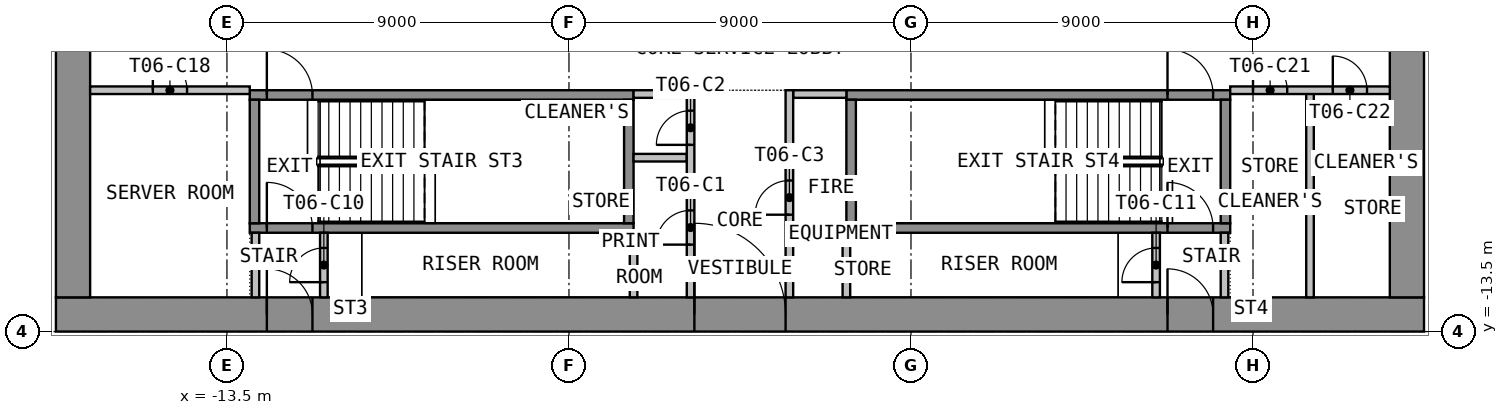
"""IFC4 building model, lengths in metres.
Left out: names, types, materials, properties, quantities, classifications, styles, units other than length and angle.
Written with IfcOpenShell. Run it as: python <this file> out.ifc"""

import sys

from ifc_helpers import new_model, si_unit, direction, frame, frame_2d, origin, place, context, subcontext, project, spatial, rectangle, extrude, element, fill, save


model = new_model("IFC4")
c1 = context("Model", 3, precision=1e-05, world=origin(), true_north=direction((0.0, 1.0)))
c2 = subcontext(c1, "Body", "Model", "MODEL_VIEW")
j1 = project(units=[si_unit("LENGTHUNIT", "METRE"), si_unit("PLANEANGLEUNIT", "RADIAN")], contexts=[c1])
p1 = place(None, origin())
s1 = spatial("IfcSite", under=j1, at=p1, CompositionType="ELEMENT")
p2 = place(p1, origin())
s2 = spatial("IfcBuilding", under=s1, at=p2, CompositionType="ELEMENT")
p3 = place(p2, frame((0.0, 0.0, 93.0)))
s3 = spatial("IfcBuildingStorey", under=s2, at=p3, CompositionType="ELEMENT", Elevation=93.0)
p4 = place(p3, frame((-18.0, -13.05, 0.0), z_axis=(0.0, 0.0, 1.0), x_axis=(1.0, 0.0, 0.0)))
e1 = element("IfcWall", 1, at=p4, inside=s3, PredefinedType="SHEAR", context=c2, shape_type="SweptSolid", body=[
    extrude(rectangle(XDim=36.0, YDim=0.9, at=frame_2d((18.0, 0.0))), origin(), (0.0, 0.0, 1.0), 3.525),
])
p5 = place(p4, frame((16.8, 0.0, 0.0)))
e2 = element("IfcOpeningElement", 2, at=p5, cuts=e1, PredefinedType="OPENING", context=c2, shape_type="SweptSolid", body=[
    extrude(rectangle(XDim=2.4, YDim=2.1, at=frame_2d((1.2, 1.05))), frame((0.0, 0.46, 0.0), z_axis=(0.0, -1.0, 0.0), x_axis=(1.0, 0.0, 0.0)), (0.0, 0.0, 1.0), 0.92),
])
p6 = place(p4, frame((5.55, 0.0, 0.0)))
e3 = element("IfcOpeningElement", 3, at=p6, cuts=e1, PredefinedType="OPENING", context=c2, shape_type="SweptSolid", body=[
    extrude(rectangle(XDim=1.2, YDim=2.1, at=frame_2d((0.6, 1.05))), frame((0.0, 0.46, 0.0), z_axis=(0.0, -1.0, 0.0), x_axis=(1.0, 0.0, 0.0)), (0.0, 0.0, 1.0), 0.92),
])
p7 = place(p4, frame((29.25, 0.0, 0.0)))
e4 = element("IfcOpeningElement", 4, at=p7, cuts=e1, PredefinedType="OPENING", context=c2, shape_type="SweptSolid", body=[
    extrude(rectangle(XDim=1.2, YDim=2.1, at=frame_2d((0.6, 1.05))), frame((0.0, 0.46, 0.0), z_axis=(0.0, -1.0, 0.0), x_axis=(1.0, 0.0, 0.0)), (0.0, 0.0, 1.0), 0.92),
])
p8 = place(p3, frame((-17.55, -12.6, 0.0), z_axis=(0.0, 0.0, 1.0), x_axis=(0.0, 1.0, 0.0)))
e5 = element("IfcWall", 5, at=p8, inside=s3, PredefinedType="SHEAR", context=c2, shape_type="SweptSolid", body=[
    extrude(rectangle(XDim=25.2, YDim=0.9, at=frame_2d((12.6, 0.0))), origin(), (0.0, 0.0, 1.0), 3.525),
])
p9 = place(p8, frame((11.4, 0.0, 0.0)))
e6 = element("IfcOpeningElement", 6, at=p9, cuts=e5, PredefinedType="OPENING", context=c2, shape_type="SweptSolid", body=[
    extrude(rectangle(XDim=2.4, YDim=2.1, at=frame_2d((1.2, 1.05))), frame((0.0, 0.46, 0.0), z_axis=(0.0, -1.0, 0.0), x_axis=(1.0, 0.0, 0.0)), (0.0, 0.0, 1.0), 0.92),
])
p10 = place(p3, frame((17.55, -12.6, 0.0), z_axis=(0.0, 0.0, 1.0), x_axis=(0.0, 1.0, 0.0)))
e7 = element("IfcWall", 7, at=p10, inside=s3, PredefinedType="SHEAR", context=c2, shape_type="SweptSolid", body=[
    extrude(rectangle(XDim=25.2, YDim=0.9, at=frame_2d((12.6, 0.0))), origin(), (0.0, 0.0, 1.0), 3.525),
])
p11 = place(p10, frame((11.4, 0.0, 0.0)))
e8 = element("IfcOpeningElement", 8, at=p11, cuts=e7, PredefinedType="OPENING", context=c2, shape_type="SweptSolid", body=[
    extrude(rectangle(XDim=2.4, YDim=2.1, at=frame_2d((1.2, 1.05))), frame((0.0, 0.46, 0.0), z_axis=(0.0, -1.0, 0.0), x_axis=(1.0, 0.0, 0.0)), (0.0, 0.0, 1.0), 0.92),
])
p12 = place(p3, frame((-12.9, -10.775, 0.0), z_axis=(0.0, 0.0, 1.0), x_axis=(1.0, 0.0, 0.0)))
e9 = element("IfcWall", 9, at=p12, inside=s3, PredefinedType="SHEAR", context=c2, shape_type="SweptSolid", body=[
    extrude(rectangle(XDim=10.1, YDim=0.25, at=frame_2d((5.05, 0.0))), origin(), (0.0, 0.0, 1.0), 3.525),
])
p13 = place(p12, frame((0.45, 0.0, 0.0)))
e10 = element("IfcOpeningElement", 10, at=p13, cuts=e9, PredefinedType="OPENING", context=c2, shape_type="SweptSolid", body=[
    extrude(rectangle(XDim=1.2, YDim=2.1, at=frame_2d((0.6, 1.05))), frame((0.0, 0.135, 0.0), z_axis=(0.0, -1.0, 0.0), x_axis=(1.0, 0.0, 0.0)), (0.0, 0.0, 1.0), 0.27),
])
p14 = place(p3, frame((-12.9, -7.275, 0.0), z_axis=(0.0, 0.0, 1.0), x_axis=(1.0, 0.0, 0.0)))
e11 = element("IfcWall", 11, at=p14, inside=s3, PredefinedType="SHEAR", context=c2, shape_type="SweptSolid", body=[
    extrude(rectangle(XDim=10.1, YDim=0.25, at=frame_2d((5.05, 0.0))), origin(), (0.0, 0.0, 1.0), 3.525),
])
p15 = place(p14, frame((0.45, 0.0, 0.0)))
e12 = element("IfcOpeningElement", 12, at=p15, cuts=e11, PredefinedType="OPENING", context=c2, shape_type="SweptSolid", body=[
    extrude(rectangle(XDim=1.2, YDim=2.1, at=frame_2d((0.6, 1.05))), frame((0.0, 0.135, 0.0), z_axis=(0.0, -1.0, 0.0), x_axis=(1.0, 0.0, 0.0)), (0.0, 0.0, 1.0), 0.27),
])
for number, where, z_axis, x_axis in (
    (13, (-12.775, -10.65, 0.0), (0.0, 0.0, 1.0), (0.0, 1.0, 0.0)),
    (14, (-2.925, -10.65, 0.0), (0.0, 0.0, 1.0), (0.0, 1.0, 0.0)),
):
    element("IfcWall", number, at=place(p3, frame(where, z_axis=z_axis, x_axis=x_axis)), inside=s3, PredefinedType="SHEAR", context=c2, shape_type="SweptSolid", body=[
        extrude(rectangle(XDim=3.25, YDim=0.25, at=frame_2d((1.625, 0.0))), origin(), (0.0, 0.0, 1.0), 3.525),
    ])
p16 = place(p3, frame((2.8, -10.775, 0.0), z_axis=(0.0, 0.0, 1.0), x_axis=(1.0, 0.0, 0.0)))
e15 = element("IfcWall", 15, at=p16, inside=s3, PredefinedType="SHEAR", context=c2, shape_type="SweptSolid", body=[
    extrude(rectangle(XDim=10.1, YDim=0.25, at=frame_2d((5.05, 0.0))), origin(), (0.0, 0.0, 1.0), 3.525),
])
p17 = place(p16, frame((8.45, 0.0, 0.0)))
e16 = element("IfcOpeningElement", 16, at=p17, cuts=e15, PredefinedType="OPENING", context=c2, shape_type="SweptSolid", body=[
    extrude(rectangle(XDim=1.2, YDim=2.1, at=frame_2d((0.6, 1.05))), frame((0.0, 0.135, 0.0), z_axis=(0.0, -1.0, 0.0), x_axis=(1.0, 0.0, 0.0)), (0.0, 0.0, 1.0), 0.27),
])
p18 = place(p3, frame((2.8, -7.275, 0.0), z_axis=(0.0, 0.0, 1.0), x_axis=(1.0, 0.0, 0.0)))
e17 = element("IfcWall", 17, at=p18, inside=s3, PredefinedType="SHEAR", context=c2, shape_type="SweptSolid", body=[
    extrude(rectangle(XDim=10.1, YDim=0.25, at=frame_2d((5.05, 0.0))), origin(), (0.0, 0.0, 1.0), 3.525),
])
p19 = place(p18, frame((8.45, 0.0, 0.0)))
e18 = element("IfcOpeningElement", 18, at=p19, cuts=e17, PredefinedType="OPENING", context=c2, shape_type="SweptSolid", body=[
    extrude(rectangle(XDim=1.2, YDim=2.1, at=frame_2d((0.6, 1.05))), frame((0.0, 0.135, 0.0), z_axis=(0.0, -1.0, 0.0), x_axis=(1.0, 0.0, 0.0)), (0.0, 0.0, 1.0), 0.27),
])
for number, where, z_axis, x_axis in (
    (19, (2.925, -10.65, 0.0), (0.0, 0.0, 1.0), (0.0, 1.0, 0.0)),
    (20, (12.775, -10.65, 0.0), (0.0, 0.0, 1.0), (0.0, 1.0, 0.0)),
):
    element("IfcWall", number, at=place(p3, frame(where, z_axis=z_axis, x_axis=x_axis)), inside=s3, PredefinedType="SHEAR", context=c2, shape_type="SweptSolid", body=[
        extrude(rectangle(XDim=3.25, YDim=0.25, at=frame_2d((1.625, 0.0))), origin(), (0.0, 0.0, 1.0), 3.525),
    ])
for number, where, z_axis, x_axis in (
    (21, (-2.8, -7.25, 0.0), (0.0, 0.0, 1.0), (1.0, 0.0, 0.0)),
    (22, (-2.8, -8.925, 0.0), (0.0, 0.0, 1.0), (1.0, 0.0, 0.0)),
    (23, (1.4, -7.25, 0.0), (0.0, 0.0, 1.0), (1.0, 0.0, 0.0)),
):
    element("IfcWall", number, at=place(p3, frame(where, z_axis=z_axis, x_axis=x_axis)), inside=s3, PredefinedType="PARTITIONING", context=c2, shape_type="SweptSolid", body=[
        extrude(rectangle(XDim=1.4, YDim=0.2, at=frame_2d((0.7, 0.0))), origin(), (0.0, 0.0, 1.0), 3.525),
    ])
p20 = place(p3, frame((-1.3, -12.6, 0.0), z_axis=(0.0, 0.0, 1.0), x_axis=(0.0, 1.0, 0.0)))
e24 = element("IfcWall", 24, at=p20, inside=s3, PredefinedType="PARTITIONING", context=c2, shape_type="SweptSolid", body=[
    extrude(rectangle(XDim=5.45, YDim=0.2, at=frame_2d((2.725, 0.0))), origin(), (0.0, 0.0, 1.0), 3.525),
])
p21 = place(p20, frame((1.387, 0.0, 0.0)))
e25 = element("IfcOpeningElement", 25, at=p21, cuts=e24, PredefinedType="OPENING", context=c2, shape_type="SweptSolid", body=[
    extrude(rectangle(XDim=0.9, YDim=2.1, at=frame_2d((0.45, 1.05))), frame((0.0, 0.11, 0.0), z_axis=(0.0, -1.0, 0.0), x_axis=(1.0, 0.0, 0.0)), (0.0, 0.0, 1.0), 0.22),
])
p22 = place(p20, frame((4.012, 0.0, 0.0)))
e26 = element("IfcOpeningElement", 26, at=p22, cuts=e24, PredefinedType="OPENING", context=c2, shape_type="SweptSolid", body=[
    extrude(rectangle(XDim=0.9, YDim=2.1, at=frame_2d((0.45, 1.05))), frame((0.0, 0.11, 0.0), z_axis=(0.0, -1.0, 0.0), x_axis=(1.0, 0.0, 0.0)), (0.0, 0.0, 1.0), 0.22),
])
p23 = place(p3, frame((1.3, -12.6, 0.0), z_axis=(0.0, 0.0, 1.0), x_axis=(0.0, 1.0, 0.0)))
e27 = element("IfcWall", 27, at=p23, inside=s3, PredefinedType="PARTITIONING", context=c2, shape_type="SweptSolid", body=[
    extrude(rectangle(XDim=5.45, YDim=0.2, at=frame_2d((2.725, 0.0))), origin(), (0.0, 0.0, 1.0), 3.525),
])
p24 = place(p23, frame((2.175, 0.0, 0.0)))
e28 = element("IfcOpeningElement", 28, at=p24, cuts=e27, PredefinedType="OPENING", context=c2, shape_type="SweptSolid", body=[
    extrude(rectangle(XDim=0.9, YDim=2.1, at=frame_2d((0.45, 1.05))), frame((0.0, 0.11, 0.0), z_axis=(0.0, -1.0, 0.0), x_axis=(1.0, 0.0, 0.0)), (0.0, 0.0, 1.0), 0.22),
])
p25 = place(p3, frame((-12.75, -12.6, 0.0), z_axis=(0.0, 0.0, 1.0), x_axis=(0.0, 1.0, 0.0)))
e29 = element("IfcWall", 29, at=p25, inside=s3, PredefinedType="PARTITIONING", context=c2, shape_type="SweptSolid", body=[
    extrude(rectangle(XDim=1.7, YDim=0.2, at=frame_2d((0.85, 0.0))), origin(), (0.0, 0.0, 1.0), 3.525),
])
p26 = place(p3, frame((-10.95, -12.6, 0.0), z_axis=(0.0, 0.0, 1.0), x_axis=(0.0, 1.0, 0.0)))
e30 = element("IfcWall", 30, at=p26, inside=s3, PredefinedType="PARTITIONING", context=c2, shape_type="SweptSolid", body=[
    extrude(rectangle(XDim=1.7, YDim=0.2, at=frame_2d((0.85, 0.0))), origin(), (0.0, 0.0, 1.0), 3.525),
])
p27 = place(p26, frame((0.4, 0.0, 0.0)))
e31 = element("IfcOpeningElement", 31, at=p27, cuts=e30, PredefinedType="OPENING", context=c2, shape_type="SweptSolid", body=[
    extrude(rectangle(XDim=0.9, YDim=2.1, at=frame_2d((0.45, 1.05))), frame((0.0, 0.11, 0.0), z_axis=(0.0, -1.0, 0.0), x_axis=(1.0, 0.0, 0.0)), (0.0, 0.0, 1.0), 0.22),
])
p28 = place(p3, frame((12.75, -12.6, 0.0), z_axis=(0.0, 0.0, 1.0), x_axis=(0.0, 1.0, 0.0)))
e32 = element("IfcWall", 32, at=p28, inside=s3, PredefinedType="PARTITIONING", context=c2, shape_type="SweptSolid", body=[
    extrude(rectangle(XDim=1.7, YDim=0.2, at=frame_2d((0.85, 0.0))), origin(), (0.0, 0.0, 1.0), 3.525),
])
p29 = place(p3, frame((10.95, -12.6, 0.0), z_axis=(0.0, 0.0, 1.0), x_axis=(0.0, 1.0, 0.0)))
e33 = element("IfcWall", 33, at=p29, inside=s3, PredefinedType="PARTITIONING", context=c2, shape_type="SweptSolid", body=[
    extrude(rectangle(XDim=1.7, YDim=0.2, at=frame_2d((0.85, 0.0))), origin(), (0.0, 0.0, 1.0), 3.525),
])
p30 = place(p29, frame((0.4, 0.0, 0.0)))
e34 = element("IfcOpeningElement", 34, at=p30, cuts=e33, PredefinedType="OPENING", context=c2, shape_type="SweptSolid", body=[
    extrude(rectangle(XDim=0.9, YDim=2.1, at=frame_2d((0.45, 1.05))), frame((0.0, 0.11, 0.0), z_axis=(0.0, -1.0, 0.0), x_axis=(1.0, 0.0, 0.0)), (0.0, 0.0, 1.0), 0.22),
])
p31 = place(p3, frame((-17.1, -7.15, 0.0), z_axis=(0.0, 0.0, 1.0), x_axis=(1.0, 0.0, 0.0)))
e35 = element("IfcWall", 35, at=p31, inside=s3, PredefinedType="PARTITIONING", context=c2, shape_type="SweptSolid", body=[
    extrude(rectangle(XDim=4.2, YDim=0.2, at=frame_2d((2.1, 0.0))), origin(), (0.0, 0.0, 1.0), 3.525),
])
p32 = place(p31, frame((1.65, 0.0, 0.0)))
e36 = element("IfcOpeningElement", 36, at=p32, cuts=e35, PredefinedType="OPENING", context=c2, shape_type="SweptSolid", body=[
    extrude(rectangle(XDim=0.9, YDim=2.1, at=frame_2d((0.45, 1.05))), frame((0.0, 0.11, 0.0), z_axis=(0.0, -1.0, 0.0), x_axis=(1.0, 0.0, 0.0)), (0.0, 0.0, 1.0), 0.22),
])
p33 = place(p3, frame((15.0, -12.6, 0.0), z_axis=(0.0, 0.0, 1.0), x_axis=(0.0, 1.0, 0.0)))
e37 = element("IfcWall", 37, at=p33, inside=s3, PredefinedType="PARTITIONING", context=c2, shape_type="SweptSolid", body=[
    extrude(rectangle(XDim=5.45, YDim=0.2, at=frame_2d((2.725, 0.0))), origin(), (0.0, 0.0, 1.0), 3.525),
])
p34 = place(p3, frame((12.9, -7.15, 0.0), z_axis=(0.0, 0.0, 1.0), x_axis=(1.0, 0.0, 0.0)))
e38 = element("IfcWall", 38, at=p34, inside=s3, PredefinedType="PARTITIONING", context=c2, shape_type="SweptSolid", body=[
    extrude(rectangle(XDim=4.2, YDim=0.2, at=frame_2d((2.1, 0.0))), origin(), (0.0, 0.0, 1.0), 3.525),
])
p35 = place(p34, frame((0.6, 0.0, 0.0)))
e39 = element("IfcOpeningElement", 39, at=p35, cuts=e38, PredefinedType="OPENING", context=c2, shape_type="SweptSolid", body=[
    extrude(rectangle(XDim=0.9, YDim=2.1, at=frame_2d((0.45, 1.05))), frame((0.0, 0.11, 0.0), z_axis=(0.0, -1.0, 0.0), x_axis=(1.0, 0.0, 0.0)), (0.0, 0.0, 1.0), 0.22),
])
p36 = place(p34, frame((2.7, 0.0, 0.0)))
e40 = element("IfcOpeningElement", 40, at=p36, cuts=e38, PredefinedType="OPENING", context=c2, shape_type="SweptSolid", body=[
    extrude(rectangle(XDim=0.9, YDim=2.1, at=frame_2d((0.45, 1.05))), frame((0.0, 0.11, 0.0), z_axis=(0.0, -1.0, 0.0), x_axis=(1.0, 0.0, 0.0)), (0.0, 0.0, 1.0), 0.22),
])
for number, where, z_axis, x_axis in (
    (41, (-2.8, -12.599, 0.0), (0.0, 0.0, 1.0), (0.0, 1.0, 0.0)),
    (42, (2.8, -10.901, 0.0), (0.0, 0.0, 1.0), (0.0, -1.0, 0.0)),
):
    element("IfcWall", number, at=place(p3, frame(where, z_axis=z_axis, x_axis=x_axis)), inside=s3, PredefinedType="PARTITIONING", context=c2, shape_type="SweptSolid", body=[
        extrude(rectangle(XDim=1.698, YDim=0.2, at=frame_2d((0.849, 0.0))), origin(), (0.0, 0.0, 1.0), 3.525),
    ])
p37 = place(p5, origin())
e43 = element("IfcDoor", 43, at=p37, inside=s3, OperationType="DOUBLE_DOOR_DOUBLE_SWING", PredefinedType="DOOR", context=c2, shape_type="SweptSolid", body=[
    extrude(rectangle(XDim=2.4, YDim=2.1, at=frame_2d((1.2, 1.05))), frame((0.0, 0.025, 0.0), z_axis=(0.0, -1.0, 0.0), x_axis=(1.0, 0.0, 0.0)), (0.0, 0.0, 1.0), 0.05),
])
fill(e2, e43)
p38 = place(p6, origin())
e44 = element("IfcDoor", 44, at=p38, inside=s3, OperationType="SINGLE_SWING_RIGHT", PredefinedType="DOOR", context=c2, shape_type="SweptSolid", body=[
    extrude(rectangle(XDim=1.2, YDim=2.1, at=frame_2d((0.6, 1.05))), frame((0.0, 0.025, 0.0), z_axis=(0.0, -1.0, 0.0), x_axis=(1.0, 0.0, 0.0)), (0.0, 0.0, 1.0), 0.05),
])
fill(e3, e44)
p39 = place(p7, origin())
e45 = element("IfcDoor", 45, at=p39, inside=s3, OperationType="SINGLE_SWING_RIGHT", PredefinedType="DOOR", context=c2, shape_type="SweptSolid", body=[
    extrude(rectangle(XDim=1.2, YDim=2.1, at=frame_2d((0.6, 1.05))), frame((0.0, 0.025, 0.0), z_axis=(0.0, -1.0, 0.0), x_axis=(1.0, 0.0, 0.0)), (0.0, 0.0, 1.0), 0.05),
])
fill(e4, e45)
p40 = place(p15, origin())
e46 = element("IfcDoor", 46, at=p40, inside=s3, OperationType="SINGLE_SWING_LEFT", PredefinedType="DOOR", context=c2, shape_type="SweptSolid", body=[
    extrude(rectangle(XDim=1.2, YDim=2.1, at=frame_2d((0.6, 1.05))), frame((0.0, 0.025, 0.0), z_axis=(0.0, -1.0, 0.0), x_axis=(1.0, 0.0, 0.0)), (0.0, 0.0, 1.0), 0.05),
])
fill(e12, e46)
p41 = place(p19, origin())
e47 = element("IfcDoor", 47, at=p41, inside=s3, OperationType="SINGLE_SWING_LEFT", PredefinedType="DOOR", context=c2, shape_type="SweptSolid", body=[
    extrude(rectangle(XDim=1.2, YDim=2.1, at=frame_2d((0.6, 1.05))), frame((0.0, 0.025, 0.0), z_axis=(0.0, -1.0, 0.0), x_axis=(1.0, 0.0, 0.0)), (0.0, 0.0, 1.0), 0.05),
])
fill(e18, e47)
p42 = place(p21, origin())
e48 = element("IfcDoor", 48, at=p42, inside=s3, OperationType="SINGLE_SWING_LEFT", PredefinedType="DOOR", context=c2, shape_type="SweptSolid", body=[
    extrude(rectangle(XDim=0.9, YDim=2.1, at=frame_2d((0.45, 1.05))), frame((0.0, 0.025, 0.0), z_axis=(0.0, -1.0, 0.0), x_axis=(1.0, 0.0, 0.0)), (0.0, 0.0, 1.0), 0.05),
])
fill(e25, e48)
p43 = place(p22, origin())
e49 = element("IfcDoor", 49, at=p43, inside=s3, OperationType="SINGLE_SWING_LEFT", PredefinedType="DOOR", context=c2, shape_type="SweptSolid", body=[
    extrude(rectangle(XDim=0.9, YDim=2.1, at=frame_2d((0.45, 1.05))), frame((0.0, 0.025, 0.0), z_axis=(0.0, -1.0, 0.0), x_axis=(1.0, 0.0, 0.0)), (0.0, 0.0, 1.0), 0.05),
])
fill(e26, e49)
p44 = place(p24, origin())
e50 = element("IfcDoor", 50, at=p44, inside=s3, OperationType="SINGLE_SWING_LEFT", PredefinedType="DOOR", context=c2, shape_type="SweptSolid", body=[
    extrude(rectangle(XDim=0.9, YDim=2.1, at=frame_2d((0.45, 1.05))), frame((0.0, 0.025, 0.0), z_axis=(0.0, -1.0, 0.0), x_axis=(1.0, 0.0, 0.0)), (0.0, 0.0, 1.0), 0.05),
])
fill(e28, e50)
p45 = place(p13, origin())
e51 = element("IfcDoor", 51, at=p45, inside=s3, OperationType="SINGLE_SWING_RIGHT", PredefinedType="DOOR", context=c2, shape_type="SweptSolid", body=[
    extrude(rectangle(XDim=1.2, YDim=2.1, at=frame_2d((0.6, 1.05))), frame((0.0, 0.025, 0.0), z_axis=(0.0, -1.0, 0.0), x_axis=(1.0, 0.0, 0.0)), (0.0, 0.0, 1.0), 0.05),
])
fill(e10, e51)
p46 = place(p27, origin())
e52 = element("IfcDoor", 52, at=p46, inside=s3, OperationType="SINGLE_SWING_LEFT", PredefinedType="DOOR", context=c2, shape_type="SweptSolid", body=[
    extrude(rectangle(XDim=0.9, YDim=2.1, at=frame_2d((0.45, 1.05))), frame((0.0, 0.025, 0.0), z_axis=(0.0, -1.0, 0.0), x_axis=(1.0, 0.0, 0.0)), (0.0, 0.0, 1.0), 0.05),
])
fill(e31, e52)
p47 = place(p17, origin())
e53 = element("IfcDoor", 53, at=p47, inside=s3, OperationType="SINGLE_SWING_RIGHT", PredefinedType="DOOR", context=c2, shape_type="SweptSolid", body=[
    extrude(rectangle(XDim=1.2, YDim=2.1, at=frame_2d((0.6, 1.05))), frame((0.0, 0.025, 0.0), z_axis=(0.0, -1.0, 0.0), x_axis=(1.0, 0.0, 0.0)), (0.0, 0.0, 1.0), 0.05),
])
fill(e16, e53)
p48 = place(p30, origin())
e54 = element("IfcDoor", 54, at=p48, inside=s3, OperationType="SINGLE_SWING_LEFT", PredefinedType="DOOR", context=c2, shape_type="SweptSolid", body=[
    extrude(rectangle(XDim=0.9, YDim=2.1, at=frame_2d((0.45, 1.05))), frame((0.0, 0.025, 0.0), z_axis=(0.0, -1.0, 0.0), x_axis=(1.0, 0.0, 0.0)), (0.0, 0.0, 1.0), 0.05),
])
fill(e34, e54)
p49 = place(p32, origin())
e55 = element("IfcDoor", 55, at=p49, inside=s3, OperationType="SINGLE_SWING_LEFT", PredefinedType="DOOR", context=c2, shape_type="SweptSolid", body=[
    extrude(rectangle(XDim=0.9, YDim=2.1, at=frame_2d((0.45, 1.05))), frame((0.0, 0.025, 0.0), z_axis=(0.0, -1.0, 0.0), x_axis=(1.0, 0.0, 0.0)), (0.0, 0.0, 1.0), 0.05),
])
fill(e36, e55)
p50 = place(p35, origin())
e56 = element("IfcDoor", 56, at=p50, inside=s3, OperationType="SINGLE_SWING_LEFT", PredefinedType="DOOR", context=c2, shape_type="SweptSolid", body=[
    extrude(rectangle(XDim=0.9, YDim=2.1, at=frame_2d((0.45, 1.05))), frame((0.0, 0.025, 0.0), z_axis=(0.0, -1.0, 0.0), x_axis=(1.0, 0.0, 0.0)), (0.0, 0.0, 1.0), 0.05),
])
fill(e39, e56)
p51 = place(p36, origin())
e57 = element("IfcDoor", 57, at=p51, inside=s3, OperationType="SINGLE_SWING_LEFT", PredefinedType="DOOR", context=c2, shape_type="SweptSolid", body=[
    extrude(rectangle(XDim=0.9, YDim=2.1, at=frame_2d((0.45, 1.05))), frame((0.0, 0.025, 0.0), z_axis=(0.0, -1.0, 0.0), x_axis=(1.0, 0.0, 0.0)), (0.0, 0.0, 1.0), 0.05),
])
fill(e40, e57)
save(model, sys.argv[1])
